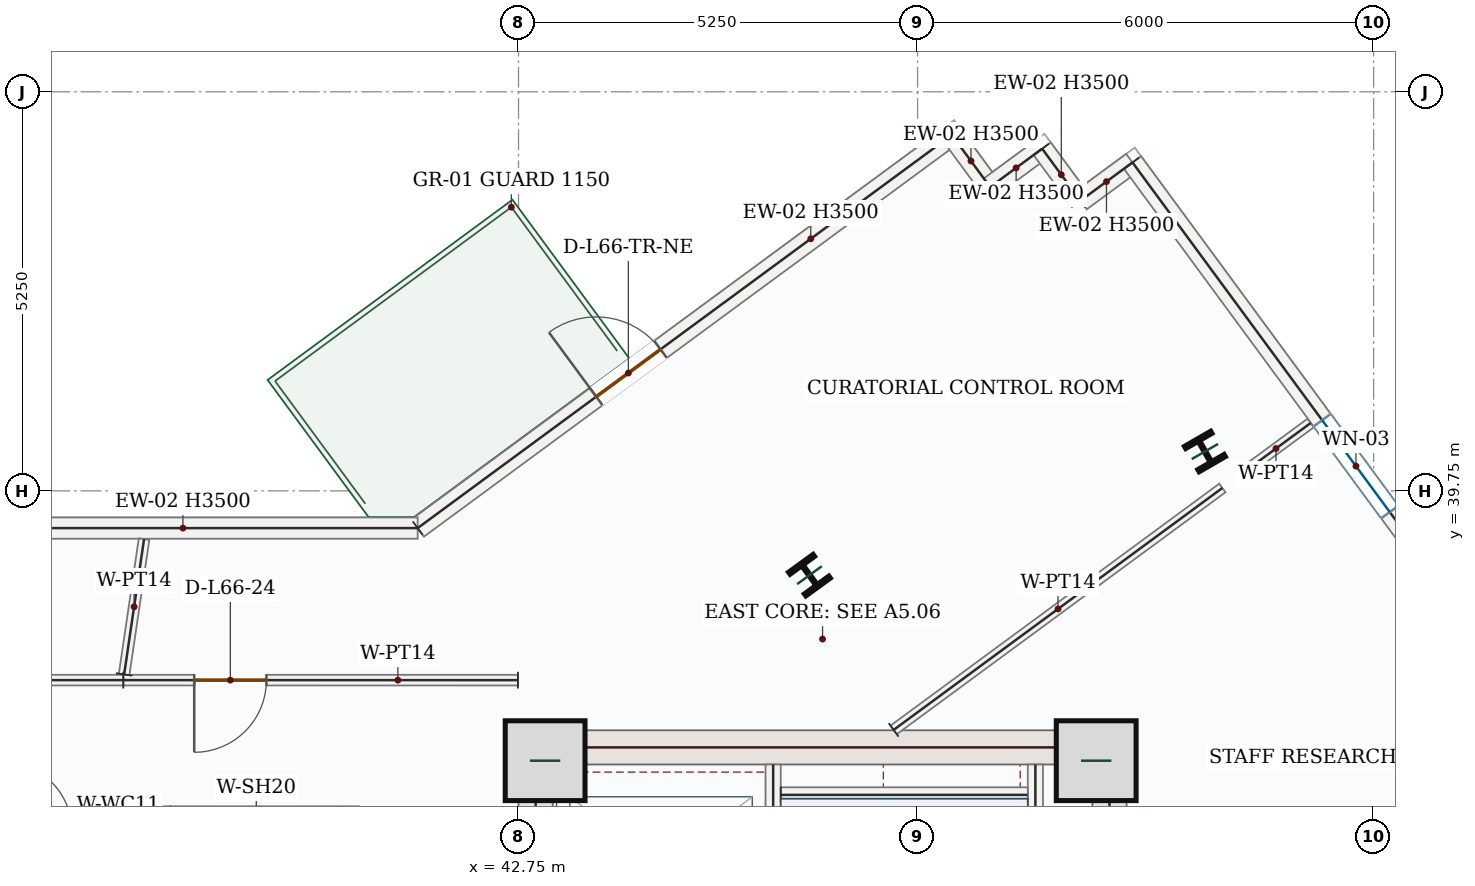
"""IFC4 building model, lengths in metres.
Left out: names, types, materials, properties, quantities, classifications, styles, units other than length and angle.
Written with IfcOpenShell. Run it as: python <this file> out.ifc"""

import sys

from ifc_helpers import new_model, si_unit, direction, frame, frame_2d, origin, origin_2d, place, context, subcontext, project, spatial, rectangle, i_section, extrude, source, transform, mapped, element, fill, save


model = new_model("IFC4")
c1 = context("Model", 3, precision=1e-05, world=origin(), true_north=direction((0.0, 1.0)))
c2 = subcontext(c1, "Body", "Model", "MODEL_VIEW")
j1 = project(units=[si_unit("LENGTHUNIT", "METRE"), si_unit("PLANEANGLEUNIT", "RADIAN")], contexts=[c1])
p1 = place(None, origin())
s1 = spatial("IfcSite", under=j1, at=p1, CompositionType="ELEMENT")
p2 = place(p1, origin())
s2 = spatial("IfcBuilding", under=s1, at=p2, CompositionType="ELEMENT")
p3 = place(p2, frame((0.0, 0.0, 276.6)))
s3 = spatial("IfcBuildingStorey", under=s2, at=p3, CompositionType="ELEMENT", Elevation=276.6)
p4 = place(p3, frame((42.975, 28.05, 0.0), z_axis=(0.0, 0.0, 1.0), x_axis=(0.0, 1.0, 0.0)))
e1 = element("IfcWall", 1, at=p4, inside=s3, PredefinedType="SHEAR", context=c2, shape_type="SweptSolid", body=[
    extrude(rectangle(XDim=8.55, YDim=0.45, at=frame_2d((4.275, 0.0))), origin(), (0.0, 0.0, 1.0), 3.5),
])
p5 = place(p4, frame((1.5, 0.0, 0.0)))
e2 = element("IfcOpeningElement", 2, at=p5, cuts=e1, PredefinedType="OPENING", context=c2, shape_type="SweptSolid", body=[
    extrude(rectangle(XDim=1.1, YDim=2.2, at=frame_2d((0.55, 1.1))), frame((0.0, 0.235, 0.0), z_axis=(0.0, -1.0, 0.0), x_axis=(1.0, 0.0, 0.0)), (0.0, 0.0, 1.0), 0.47),
])
m1 = source(origin(), c2, "Body", "SweptSolid", [
    extrude(rectangle(XDim=8.55, YDim=0.45, at=frame_2d((4.275, 0.0))), origin(), (0.0, 0.0, 1.0), 3.5),
])
p6 = place(p3, frame((50.525, 28.05, 0.0), z_axis=(0.0, 0.0, 1.0), x_axis=(0.0, 1.0, 0.0)))
e3 = element("IfcWall", 3, at=p6, inside=s3, PredefinedType="SHEAR", context=c2, shape_type="MappedRepresentation", body=[
    mapped(m1, transform((0.0, 0.0, 0.0), x_axis=(1.0, 0.0, 0.0), y_axis=(0.0, 1.0, 0.0), z_axis=(0.0, 0.0, 1.0), scale=1.0)),
])
m2 = source(origin(), c2, "Body", "SweptSolid", [
    extrude(rectangle(XDim=7.1, YDim=0.45, at=frame_2d((3.55, 0.0))), origin(), (0.0, 0.0, 1.0), 3.5),
])
p7 = place(p3, frame((43.2, 36.375, 0.0), z_axis=(0.0, 0.0, 1.0), x_axis=(1.0, 0.0, 0.0)))
e4 = element("IfcWall", 4, at=p7, inside=s3, PredefinedType="SHEAR", context=c2, shape_type="MappedRepresentation", body=[
    mapped(m2, transform((0.0, 0.0, 0.0), x_axis=(1.0, 0.0, 0.0), y_axis=(0.0, 1.0, 0.0), z_axis=(0.0, 0.0, 1.0), scale=1.0)),
])
m3 = source(origin(), c2, "Body", "SweptSolid", [
    extrude(rectangle(XDim=1.05, YDim=1.05, at=origin_2d()), origin(), (0.0, 0.0, 1.0), 3.75),
])
for number, where, z_axis, x_axis in (
    (5, (43.1, 36.2, 0.0), (0.0, 0.0, 1.0), (1.0, 0.0, 0.0)),
    (6, (50.35, 36.2, 0.0), (0.0, 0.0, 1.0), (1.0, 0.0, 0.0)),
):
    element("IfcColumn", number, at=place(p3, frame(where, z_axis=z_axis, x_axis=x_axis)), inside=s3, PredefinedType="COLUMN", context=c2, shape_type="MappedRepresentation", body=[
        mapped(m3, transform((0.0, 0.0, 0.0), x_axis=(1.0, 0.0, 0.0), y_axis=(0.0, 1.0, 0.0), z_axis=(0.0, 0.0, 1.0), scale=1.0)),
    ])
m4 = source(origin(), c2, "Body", "SweptSolid", [
    extrude(i_section(OverallWidth=0.399, OverallDepth=0.386, WebThickness=0.021, FlangeThickness=0.033, FilletRadius=0.018, at=origin_2d()), origin(), (0.0, 0.0, 1.0), 3.75),
])
for number, where, z_axis, x_axis in (
    (7, (46.578, 38.641, 0.0), (0.0, 0.0, 1.0), (0.809, 0.588, 0.0)),
    (8, (51.78, 40.268, 0.0), (0.0, 0.0, 1.0), (0.866, 0.5, 0.0)),
):
    element("IfcColumn", number, at=place(p3, frame(where, z_axis=z_axis, x_axis=x_axis)), inside=s3, PredefinedType="COLUMN", context=c2, shape_type="MappedRepresentation", body=[
        mapped(m4, transform((0.0, 0.0, 0.0), x_axis=(1.0, 0.0, 0.0), y_axis=(0.0, 1.0, 0.0), z_axis=(0.0, 0.0, 1.0), scale=1.0)),
    ])
p8 = place(p3, frame((41.423, 39.26, 0.0), z_axis=(0.0, 0.0, 1.0), x_axis=(0.805403112922, 0.592727446383, 0.0)))
e9 = element("IfcWall", 9, at=p8, inside=s3, PredefinedType="SOLIDWALL", context=c2, shape_type="SweptSolid", body=[
    extrude(rectangle(XDim=8.726, YDim=0.28, at=frame_2d((4.363, 0.0))), origin(), (0.0, 0.0, 1.0), 3.5),
])
p9 = place(p8, frame((2.917, 0.0, 0.0)))
e10 = element("IfcOpeningElement", 10, at=p9, cuts=e9, PredefinedType="OPENING", context=c2, shape_type="SweptSolid", body=[
    extrude(rectangle(XDim=1.05, YDim=2.15, at=frame_2d((0.525, 1.075))), frame((0.0, 0.15, 0.0), z_axis=(0.0, -1.0, 0.0), x_axis=(1.0, 0.0, 0.0)), (0.0, 0.0, 1.0), 0.3),
])
m5 = source(origin(), c2, "Body", "SweptSolid", [
    extrude(rectangle(XDim=0.85, YDim=0.28, at=frame_2d((0.425, 0.0))), origin(), (0.0, 0.0, 1.0), 3.5),
])
p10 = place(p3, frame((48.451, 44.432, 0.0), z_axis=(0.0, 0.0, 1.0), x_axis=(0.592807079659, -0.80534450163, 0.0)))
e11 = element("IfcWall", 11, at=p10, inside=s3, PredefinedType="SOLIDWALL", context=c2, shape_type="MappedRepresentation", body=[
    mapped(m5, transform((0.0, 0.0, 0.0), x_axis=(1.0, 0.0, 0.0), y_axis=(0.0, 1.0, 0.0), z_axis=(0.0, 0.0, 1.0), scale=1.0)),
])
m6 = source(origin(), c2, "Body", "SweptSolid", [
    extrude(rectangle(XDim=0.85, YDim=0.28, at=frame_2d((0.425, 0.0))), origin(), (0.0, 0.0, 1.0), 3.5),
])
for number, where, z_axis, x_axis in (
    (12, (48.955, 43.747, 0.0), (0.0, 0.0, 1.0), (0.805, 0.593, 0.0)),
    (13, (49.639, 44.251, 0.0), (0.0, 0.0, 1.0), (0.593, -0.805, 0.0)),
):
    element("IfcWall", number, at=place(p3, frame(where, z_axis=z_axis, x_axis=x_axis)), inside=s3, PredefinedType="SOLIDWALL", context=c2, shape_type="MappedRepresentation", body=[
        mapped(m6, transform((0.0, 0.0, 0.0), x_axis=(1.0, 0.0, 0.0), y_axis=(0.0, 1.0, 0.0), z_axis=(0.0, 0.0, 1.0), scale=1.0)),
    ])
p11 = place(p3, frame((50.143, 43.566, 0.0), z_axis=(0.0, 0.0, 1.0), x_axis=(0.80534450163, 0.592807079659, 0.0)))
e14 = element("IfcWall", 14, at=p11, inside=s3, PredefinedType="SOLIDWALL", context=c2, shape_type="MappedRepresentation", body=[
    mapped(m5, transform((0.0, 0.0, 0.0), x_axis=(1.0, 0.0, 0.0), y_axis=(0.0, 1.0, 0.0), z_axis=(0.0, 0.0, 1.0), scale=1.0)),
])
p12 = place(p3, frame((50.827, 44.07, 0.0), z_axis=(0.0, 0.0, 1.0), x_axis=(0.592722097771, -0.805407049146, 0.0)))
e15 = element("IfcWall", 15, at=p12, inside=s3, PredefinedType="SOLIDWALL", context=c2, shape_type="SweptSolid", body=[
    extrude(rectangle(XDim=9.92, YDim=0.28, at=frame_2d((4.96, 0.0))), origin(), (0.0, 0.0, 1.0), 3.5),
])
p13 = place(p12, frame((4.21, 0.0, 0.85)))
e16 = element("IfcOpeningElement", 16, at=p13, cuts=e15, PredefinedType="OPENING", context=c2, shape_type="SweptSolid", body=[
    extrude(rectangle(XDim=1.5, YDim=1.5, at=frame_2d((0.75, 0.75))), frame((0.0, 0.15, 0.0), z_axis=(0.0, -1.0, 0.0), x_axis=(1.0, 0.0, 0.0)), (0.0, 0.0, 1.0), 0.3),
])
m7 = source(origin(), c2, "Body", "SweptSolid", [
    extrude(rectangle(XDim=6.177, YDim=0.28, at=frame_2d((3.088, 0.0))), origin(), (0.0, 0.0, 1.0), 3.5),
])
p14 = place(p3, frame((35.247, 39.26, 0.0), z_axis=(0.0, 0.0, 1.0), x_axis=(1.0, 0.0, 0.0)))
e17 = element("IfcWall", 17, at=p14, inside=s3, PredefinedType="SOLIDWALL", context=c2, shape_type="MappedRepresentation", body=[
    mapped(m7, transform((0.0, 0.0, 0.0), x_axis=(1.0, 0.0, 0.0), y_axis=(0.0, 1.0, 0.0), z_axis=(0.0, 0.0, 1.0), scale=1.0)),
])
m8 = source(origin(), c2, "Body", "SweptSolid", [
    extrude(rectangle(XDim=7.87, YDim=0.2, at=frame_2d((3.935, 0.0))), origin(), (0.0, 0.0, 1.0), 3.5),
])
p15 = place(p3, frame((49.55, 28.28, 0.0), z_axis=(0.0, 0.0, 1.0), x_axis=(0.0, 1.0, 0.0)))
e18 = element("IfcWall", 18, at=p15, inside=s3, PredefinedType="SOLIDWALL", context=c2, shape_type="MappedRepresentation", body=[
    mapped(m8, transform((0.0, 0.0, 0.0), x_axis=(1.0, 0.0, 0.0), y_axis=(0.0, 1.0, 0.0), z_axis=(0.0, 0.0, 1.0), scale=1.0)),
])
p16 = place(p3, frame((46.1, 28.15, 0.0), z_axis=(0.0, 0.0, 1.0), x_axis=(0.0, 1.0, 0.0)))
e19 = element("IfcWall", 19, at=p16, inside=s3, PredefinedType="SOLIDWALL", context=c2, shape_type="SweptSolid", body=[
    extrude(rectangle(XDim=8.0, YDim=0.2, at=frame_2d((4.0, 0.0))), origin(), (0.0, 0.0, 1.0), 3.5),
])
p17 = place(p16, frame((0.4, 0.0, 0.0)))
e20 = element("IfcOpeningElement", 20, at=p17, cuts=e19, PredefinedType="OPENING", context=c2, shape_type="SweptSolid", body=[
    extrude(rectangle(XDim=1.05, YDim=2.15, at=frame_2d((0.525, 1.075))), frame((0.0, 0.11, 0.0), z_axis=(0.0, -1.0, 0.0), x_axis=(1.0, 0.0, 0.0)), (0.0, 0.0, 1.0), 0.22),
])
m9 = source(origin(), c2, "Body", "SweptSolid", [
    extrude(rectangle(XDim=3.25, YDim=0.2, at=frame_2d((1.625, 0.0))), origin(), (0.0, 0.0, 1.0), 3.5),
])
p18 = place(p3, frame((46.2, 35.75, 0.0), z_axis=(0.0, 0.0, 1.0), x_axis=(1.0, 0.0, 0.0)))
e21 = element("IfcWall", 21, at=p18, inside=s3, PredefinedType="SOLIDWALL", context=c2, shape_type="MappedRepresentation", body=[
    mapped(m9, transform((0.0, 0.0, 0.0), x_axis=(1.0, 0.0, 0.0), y_axis=(0.0, 1.0, 0.0), z_axis=(0.0, 0.0, 1.0), scale=1.0)),
])
m10 = source(origin(), c2, "Body", "SweptSolid", [
    extrude(rectangle(XDim=2.4, YDim=0.2, at=frame_2d((1.2, 0.0))), origin(), (0.0, 0.0, 1.0), 3.5),
])
p19 = place(p3, frame((38.05, 33.2, 0.0), z_axis=(0.0, 0.0, 1.0), x_axis=(0.0, 1.0, 0.0)))
e22 = element("IfcWall", 22, at=p19, inside=s3, PredefinedType="SOLIDWALL", context=c2, shape_type="MappedRepresentation", body=[
    mapped(m10, transform((0.0, 0.0, 0.0), x_axis=(1.0, 0.0, 0.0), y_axis=(0.0, 1.0, 0.0), z_axis=(0.0, 0.0, 1.0), scale=1.0)),
])
p20 = place(p3, frame((40.55, 33.2, 0.0), z_axis=(0.0, 0.0, 1.0), x_axis=(0.0, 1.0, 0.0)))
e23 = element("IfcWall", 23, at=p20, inside=s3, PredefinedType="SOLIDWALL", context=c2, shape_type="SweptSolid", body=[
    extrude(rectangle(XDim=2.4, YDim=0.2, at=frame_2d((1.2, 0.0))), origin(), (0.0, 0.0, 1.0), 3.5),
])
p21 = place(p20, frame((0.65, 0.0, 0.0)))
e24 = element("IfcOpeningElement", 24, at=p21, cuts=e23, PredefinedType="OPENING", context=c2, shape_type="SweptSolid", body=[
    extrude(rectangle(XDim=1.1, YDim=2.15, at=frame_2d((0.55, 1.075))), frame((0.0, 0.11, 0.0), z_axis=(0.0, -1.0, 0.0), x_axis=(1.0, 0.0, 0.0)), (0.0, 0.0, 1.0), 0.22),
])
m11 = source(origin(), c2, "Body", "SweptSolid", [
    extrude(rectangle(XDim=5.37, YDim=0.14, at=frame_2d((2.685, 0.0))), origin(), (0.0, 0.0, 1.0), 3.5),
])
p22 = place(p3, frame((47.685, 36.605, 0.0), z_axis=(0.0, 0.0, 1.0), x_axis=(0.805412248971, 0.592715032041, 0.0)))
e25 = element("IfcWall", 25, at=p22, inside=s3, PredefinedType="PARTITIONING", context=c2, shape_type="MappedRepresentation", body=[
    mapped(m11, transform((0.0, 0.0, 0.0), x_axis=(1.0, 0.0, 0.0), y_axis=(0.0, 1.0, 0.0), z_axis=(0.0, 0.0, 1.0), scale=1.0)),
])
m12 = source(origin(), c2, "Body", "SweptSolid", [
    extrude(rectangle(XDim=1.13, YDim=0.14, at=frame_2d((0.565, 0.0))), origin(), (0.0, 0.0, 1.0), 3.5),
])
p23 = place(p3, frame((52.26, 39.972, 0.0), z_axis=(0.0, 0.0, 1.0), x_axis=(0.805359802525, 0.592786292416, 0.0)))
e26 = element("IfcWall", 26, at=p23, inside=s3, PredefinedType="PARTITIONING", context=c2, shape_type="MappedRepresentation", body=[
    mapped(m12, transform((0.0, 0.0, 0.0), x_axis=(1.0, 0.0, 0.0), y_axis=(0.0, 1.0, 0.0), z_axis=(0.0, 0.0, 1.0), scale=1.0)),
])
p24 = place(p3, frame((42.742, 37.26, 0.0), z_axis=(0.0, 0.0, 1.0), x_axis=(-0.999999998895, 4.7021207e-05, 0.0)))
e27 = element("IfcWall", 27, at=p24, inside=s3, PredefinedType="PARTITIONING", context=c2, shape_type="SweptSolid", body=[
    extrude(rectangle(XDim=5.192, YDim=0.14, at=frame_2d((2.596, 0.0))), origin(), (0.0, 0.0, 1.0), 3.5),
])
p25 = place(p24, frame((3.309, 0.0, 0.0)))
e28 = element("IfcOpeningElement", 28, at=p25, cuts=e27, PredefinedType="OPENING", context=c2, shape_type="SweptSolid", body=[
    extrude(rectangle(XDim=0.95, YDim=2.15, at=frame_2d((0.475, 1.075))), frame((0.0, 0.08, 0.0), z_axis=(0.0, -1.0, 0.0), x_axis=(1.0, 0.0, 0.0)), (0.0, 0.0, 1.0), 0.16),
])
m13 = source(origin(), c2, "Body", "SweptSolid", [
    extrude(rectangle(XDim=1.799, YDim=0.14, at=frame_2d((0.9, 0.0))), origin(), (0.0, 0.0, 1.0), 3.5),
])
p26 = place(p3, frame((37.561, 37.335, 0.0), z_axis=(0.0, 0.0, 1.0), x_axis=(0.14573227875, 0.989324063657, 0.0)))
e29 = element("IfcWall", 29, at=p26, inside=s3, PredefinedType="PARTITIONING", context=c2, shape_type="MappedRepresentation", body=[
    mapped(m13, transform((0.0, 0.0, 0.0), x_axis=(1.0, 0.0, 0.0), y_axis=(0.0, 1.0, 0.0), z_axis=(0.0, 0.0, 1.0), scale=1.0)),
])
p27 = place(p3, frame((37.55, 37.26, 0.0), z_axis=(0.0, 0.0, 1.0), x_axis=(-0.999999998268, -5.8852956e-05, 0.0)))
e30 = element("IfcWall", 30, at=p27, inside=s3, PredefinedType="PARTITIONING", context=c2, shape_type="SweptSolid", body=[
    extrude(rectangle(XDim=8.297, YDim=0.14, at=frame_2d((4.148, 0.0))), origin(), (0.0, 0.0, 1.0), 3.5),
])
p28 = place(p27, frame((1.616, 0.0, 0.0)))
e31 = element("IfcOpeningElement", 31, at=p28, cuts=e30, PredefinedType="OPENING", context=c2, shape_type="SweptSolid", body=[
    extrude(rectangle(XDim=0.95, YDim=2.15, at=frame_2d((0.475, 1.075))), frame((0.0, 0.08, 0.0), z_axis=(0.0, -1.0, 0.0), x_axis=(1.0, 0.0, 0.0)), (0.0, 0.0, 1.0), 0.16),
])
m14 = source(origin(), c2, "Body", "SweptSolid", [
    extrude(rectangle(XDim=1.05, YDim=2.15, at=frame_2d((0.525, 1.075))), frame((0.0, 0.025, 0.0), z_axis=(0.0, -1.0, 0.0), x_axis=(1.0, 0.0, 0.0)), (0.0, 0.0, 1.0), 0.05),
])
p29 = place(p9, origin())
e32 = element("IfcDoor", 32, at=p29, inside=s3, OperationType="SINGLE_SWING_LEFT", PredefinedType="DOOR", context=c2, shape_type="MappedRepresentation", body=[
    mapped(m14, transform((0.0, 0.0, 0.0), x_axis=(1.0, 0.0, 0.0), y_axis=(0.0, 1.0, 0.0), z_axis=(0.0, 0.0, 1.0), scale=1.0)),
])
fill(e10, e32)
m15 = source(origin(), c2, "Body", "SweptSolid", [
    extrude(rectangle(XDim=1.5, YDim=1.5, at=frame_2d((0.75, 0.75))), frame((0.0, 0.03, 0.0), z_axis=(0.0, -1.0, 0.0), x_axis=(1.0, 0.0, 0.0)), (0.0, 0.0, 1.0), 0.06),
])
p30 = place(p13, origin())
e33 = element("IfcWindow", 33, at=p30, inside=s3, PartitioningType="SINGLE_PANEL", PredefinedType="WINDOW", context=c2, shape_type="MappedRepresentation", body=[
    mapped(m15, transform((0.0, 0.0, 0.0), x_axis=(1.0, 0.0, 0.0), y_axis=(0.0, 1.0, 0.0), z_axis=(0.0, 0.0, 1.0), scale=1.0)),
])
fill(e16, e33)
m16 = source(origin(), c2, "Body", "SweptSolid", [
    extrude(rectangle(XDim=0.95, YDim=2.15, at=frame_2d((0.475, 1.075))), frame((0.0, 0.025, 0.0), z_axis=(0.0, -1.0, 0.0), x_axis=(1.0, 0.0, 0.0)), (0.0, 0.0, 1.0), 0.05),
])
p31 = place(p25, origin())
e34 = element("IfcDoor", 34, at=p31, inside=s3, OperationType="SINGLE_SWING_RIGHT", PredefinedType="DOOR", context=c2, shape_type="MappedRepresentation", body=[
    mapped(m16, transform((0.0, 0.0, 0.0), x_axis=(1.0, 0.0, 0.0), y_axis=(0.0, 1.0, 0.0), z_axis=(0.0, 0.0, 1.0), scale=1.0)),
])
fill(e28, e34)
save(model, sys.argv[1])
